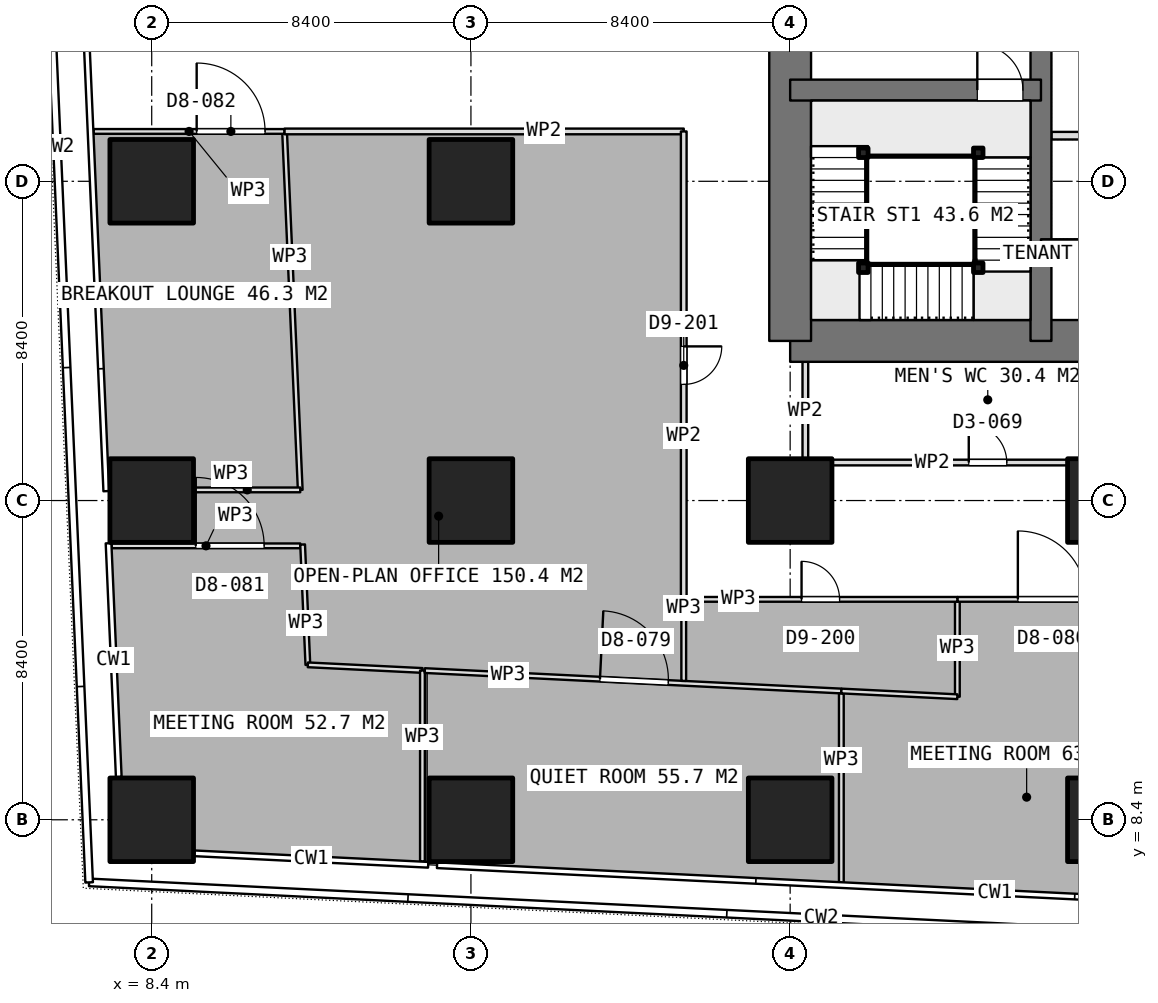
"""IFC4 building model, lengths in metres.
Left out: names, types, materials, properties, quantities, classifications, styles, units other than length and angle.
Written with IfcOpenShell. Run it as: python <this file> out.ifc"""

import sys

from ifc_helpers import new_model, si_unit, direction, frame, frame_2d, origin, origin_2d, place, context, subcontext, project, spatial, rectangle, extrude, element, fill, save


model = new_model("IFC4")
c1 = context("Model", 3, precision=1e-05, world=origin(), true_north=direction((0.0, 1.0)))
c2 = subcontext(c1, "Body", "Model", "MODEL_VIEW")
j1 = project(units=[si_unit("LENGTHUNIT", "METRE"), si_unit("PLANEANGLEUNIT", "RADIAN")], contexts=[c1])
p1 = place(None, origin())
s1 = spatial("IfcSite", under=j1, at=p1, CompositionType="ELEMENT")
p2 = place(p1, origin())
s2 = spatial("IfcBuilding", under=s1, at=p2, CompositionType="ELEMENT")
p3 = place(p2, frame((0.0, 0.0, 62.9)))
s3 = spatial("IfcBuildingStorey", under=s2, at=p3, CompositionType="ELEMENT", Elevation=62.9)
p4 = place(p3, frame((25.2, 21.0, 0.0), z_axis=(0.0, 0.0, 1.0), x_axis=(1.0, 0.0, 0.0)))
e1 = element("IfcWall", 1, at=p4, inside=s3, PredefinedType="SHEAR", context=c2, shape_type="SweptSolid", body=[
    extrude(rectangle(XDim=10.4, YDim=1.1, at=frame_2d((5.2, 0.0))), origin(), (0.0, 0.0, 1.0), 3.75),
])
p5 = place(p3, frame((25.2, 21.0, 0.0), z_axis=(0.0, 0.0, 1.0), x_axis=(0.0, 1.0, 0.0)))
e2 = element("IfcWall", 2, at=p5, inside=s3, PredefinedType="SHEAR", context=c2, shape_type="SweptSolid", body=[
    extrude(rectangle(XDim=25.2, YDim=1.1, at=frame_2d((12.6, 0.0))), origin(), (0.0, 0.0, 1.0), 3.75),
])
p6 = place(p5, frame((7.8, 0.0, 0.0)))
e3 = element("IfcOpeningElement", 3, at=p6, cuts=e2, PredefinedType="OPENING", context=c2, shape_type="SweptSolid", body=[
    extrude(rectangle(XDim=1.2, YDim=2.1, at=frame_2d((0.6, 1.05))), frame((0.0, 0.56, 0.0), z_axis=(0.0, -1.0, 0.0), x_axis=(1.0, 0.0, 0.0)), (0.0, 0.0, 1.0), 1.12),
])
p7 = place(p5, frame((14.25, 0.0, 0.0)))
e4 = element("IfcOpeningElement", 4, at=p7, cuts=e2, PredefinedType="OPENING", context=c2, shape_type="SweptSolid", body=[
    extrude(rectangle(XDim=0.9, YDim=2.1, at=frame_2d((0.45, 1.05))), frame((0.0, 0.56, 0.0), z_axis=(0.0, -1.0, 0.0), x_axis=(1.0, 0.0, 0.0)), (0.0, 0.0, 1.0), 1.12),
])
p8 = place(p5, frame((16.85, 0.0, 0.0)))
e5 = element("IfcOpeningElement", 5, at=p8, cuts=e2, PredefinedType="OPENING", context=c2, shape_type="SweptSolid", body=[
    extrude(rectangle(XDim=0.9, YDim=2.1, at=frame_2d((0.45, 1.05))), frame((0.0, 0.56, 0.0), z_axis=(0.0, -1.0, 0.0), x_axis=(1.0, 0.0, 0.0)), (0.0, 0.0, 1.0), 1.12),
])
p9 = place(p5, frame((19.075, 0.0, 0.0)))
e6 = element("IfcOpeningElement", 6, at=p9, cuts=e2, PredefinedType="OPENING", context=c2, shape_type="SweptSolid", body=[
    extrude(rectangle(XDim=1.2, YDim=2.1, at=frame_2d((0.6, 1.05))), frame((0.0, 0.56, 0.0), z_axis=(0.0, -1.0, 0.0), x_axis=(1.0, 0.0, 0.0)), (0.0, 0.0, 1.0), 1.12),
])
p10 = place(p3, frame((31.8, 21.0, 0.0), z_axis=(0.0, 0.0, 1.0), x_axis=(0.0, 1.0, 0.0)))
e7 = element("IfcWall", 7, at=p10, inside=s3, PredefinedType="SHEAR", context=c2, shape_type="SweptSolid", body=[
    extrude(rectangle(XDim=25.2, YDim=0.55, at=frame_2d((12.6, 0.0))), origin(), (0.0, 0.0, 1.0), 3.75),
])
p11 = place(p3, frame((31.8, 23.4, 0.0), z_axis=(0.0, 0.0, 1.0), x_axis=(1.0, 0.0, 0.0)))
e8 = element("IfcWall", 8, at=p11, inside=s3, PredefinedType="SHEAR", context=c2, shape_type="SweptSolid", body=[
    extrude(rectangle(XDim=3.8, YDim=0.55, at=frame_2d((1.9, 0.0))), origin(), (0.0, 0.0, 1.0), 3.75),
])
p12 = place(p3, frame((25.2, 27.6, 0.0), z_axis=(0.0, 0.0, 1.0), x_axis=(1.0, 0.0, 0.0)))
e9 = element("IfcWall", 9, at=p12, inside=s3, PredefinedType="SHEAR", context=c2, shape_type="SweptSolid", body=[
    extrude(rectangle(XDim=6.6, YDim=0.55, at=frame_2d((3.3, 0.0))), origin(), (0.0, 0.0, 1.0), 3.75),
])
p13 = place(p12, frame((4.925, 0.0, 0.0)))
e10 = element("IfcOpeningElement", 10, at=p13, cuts=e9, PredefinedType="OPENING", context=c2, shape_type="SweptSolid", body=[
    extrude(rectangle(XDim=1.2, YDim=2.1, at=frame_2d((0.6, 1.05))), frame((0.0, 0.285, 0.0), z_axis=(0.0, -1.0, 0.0), x_axis=(1.0, 0.0, 0.0)), (0.0, 0.0, 1.0), 0.57),
])
for number, where, z_axis, x_axis in (
    (11, (8.4, 8.4, 0.0), (0.0, 0.0, 1.0), (1.0, 0.0, 0.0)),
    (12, (8.4, 16.8, 0.0), (0.0, 0.0, 1.0), (1.0, 0.0, 0.0)),
    (13, (8.4, 25.2, 0.0), (0.0, 0.0, 1.0), (1.0, 0.0, 0.0)),
    (14, (16.8, 8.4, 0.0), (0.0, 0.0, 1.0), (1.0, 0.0, 0.0)),
    (15, (16.8, 16.8, 0.0), (0.0, 0.0, 1.0), (1.0, 0.0, 0.0)),
    (16, (16.8, 25.2, 0.0), (0.0, 0.0, 1.0), (1.0, 0.0, 0.0)),
    (17, (25.2, 8.4, 0.0), (0.0, 0.0, 1.0), (1.0, 0.0, 0.0)),
    (18, (25.2, 16.8, 0.0), (0.0, 0.0, 1.0), (1.0, 0.0, 0.0)),
    (19, (33.6, 8.4, 0.0), (0.0, 0.0, 1.0), (1.0, 0.0, 0.0)),
    (20, (33.6, 16.8, 0.0), (0.0, 0.0, 1.0), (1.0, 0.0, 0.0)),
):
    element("IfcColumn", number, at=place(p3, frame(where, z_axis=z_axis, x_axis=x_axis)), inside=s3, PredefinedType="COLUMN", context=c2, shape_type="SweptSolid", body=[
        extrude(rectangle(XDim=2.2, YDim=2.2, at=origin_2d()), origin(), (0.0, 0.0, 1.0), 3.75),
    ])
p14 = place(p3, frame((32.075, 26.4, 0.0), z_axis=(0.0, 0.0, 1.0), x_axis=(1.0, 0.0, 0.0)))
e21 = element("IfcWall", 21, at=p14, inside=s3, PredefinedType="PARTITIONING", context=c2, shape_type="SweptSolid", body=[
    extrude(rectangle(XDim=3.25, YDim=0.2, at=frame_2d((1.625, 0.0))), origin(), (0.0, 0.0, 1.0), 3.5),
])
p15 = place(p3, frame((25.525, 17.8, 0.0), z_axis=(0.0, 0.0, 1.0), x_axis=(1.0, 0.0, 0.0)))
e22 = element("IfcWall", 22, at=p15, inside=s3, PredefinedType="PARTITIONING", context=c2, shape_type="SweptSolid", body=[
    extrude(rectangle(XDim=9.75, YDim=0.15, at=frame_2d((4.875, 0.0))), origin(), (0.0, 0.0, 1.0), 3.5),
])
p16 = place(p15, frame((4.375, 0.0, 0.0)))
e23 = element("IfcOpeningElement", 23, at=p16, cuts=e22, PredefinedType="OPENING", context=c2, shape_type="SweptSolid", body=[
    extrude(rectangle(XDim=1.0, YDim=2.1, at=frame_2d((0.5, 1.05))), frame((0.0, 0.085, 0.0), z_axis=(0.0, -1.0, 0.0), x_axis=(1.0, 0.0, 0.0)), (0.0, 0.0, 1.0), 0.17),
])
p17 = place(p3, frame((25.6, 17.875, 0.0), z_axis=(0.0, 0.0, 1.0), x_axis=(0.0, 1.0, 0.0)))
e24 = element("IfcWall", 24, at=p17, inside=s3, PredefinedType="PARTITIONING", context=c2, shape_type="SweptSolid", body=[
    extrude(rectangle(XDim=2.575, YDim=0.15, at=frame_2d((1.288, 0.0))), origin(), (0.0, 0.0, 1.0), 3.5),
])
p18 = place(p3, frame((11.896, 26.512, 0.0), z_axis=(0.0, 0.0, 1.0), x_axis=(0.043651567972, -0.999046816027, 0.0)))
e25 = element("IfcWall", 25, at=p18, inside=s3, PredefinedType="PARTITIONING", context=c2, shape_type="SweptSolid", body=[
    extrude(rectangle(XDim=9.441, YDim=0.125, at=frame_2d((4.72, 0.0))), origin(), (0.0, 0.0, 1.0), 3.5),
])
p19 = place(p3, frame((12.308, 17.08, 0.0), z_axis=(0.0, 0.0, 1.0), x_axis=(-1.0, 0.0, 0.0)))
e26 = element("IfcWall", 26, at=p19, inside=s3, PredefinedType="PARTITIONING", context=c2, shape_type="SweptSolid", body=[
    extrude(rectangle(XDim=2.788, YDim=0.125, at=frame_2d((1.394, 0.0))), origin(), (0.0, 0.0, 1.0), 3.5),
])
p20 = place(p3, frame((6.871, 26.512, 0.0), z_axis=(0.0, 0.0, 1.0), x_axis=(1.0, 0.0, 0.0)))
e27 = element("IfcWall", 27, at=p20, inside=s3, PredefinedType="PARTITIONING", context=c2, shape_type="SweptSolid", body=[
    extrude(rectangle(XDim=5.025, YDim=0.125, at=frame_2d((2.512, 0.0))), origin(), (0.0, 0.0, 1.0), 3.5),
])
p21 = place(p20, frame((2.712, 0.0, 0.0)))
e28 = element("IfcOpeningElement", 28, at=p21, cuts=e27, PredefinedType="OPENING", context=c2, shape_type="SweptSolid", body=[
    extrude(rectangle(XDim=1.8, YDim=2.1, at=frame_2d((0.9, 1.05))), frame((0.0, 0.073, 0.0), z_axis=(0.0, -1.0, 0.0), x_axis=(1.0, 0.0, 0.0)), (0.0, 0.0, 1.0), 0.145),
])
p22 = place(p3, frame((7.347, 15.608, 0.0), z_axis=(0.0, 0.0, 1.0), x_axis=(1.0, 0.0, 0.0)))
e29 = element("IfcWall", 29, at=p22, inside=s3, PredefinedType="PARTITIONING", context=c2, shape_type="SweptSolid", body=[
    extrude(rectangle(XDim=4.963, YDim=0.125, at=frame_2d((2.481, 0.0))), origin(), (0.0, 0.0, 1.0), 3.5),
])
p23 = place(p22, frame((2.212, 0.0, 0.0)))
e30 = element("IfcOpeningElement", 30, at=p23, cuts=e29, PredefinedType="OPENING", context=c2, shape_type="SweptSolid", body=[
    extrude(rectangle(XDim=1.8, YDim=2.1, at=frame_2d((0.9, 1.05))), frame((0.0, 0.073, 0.0), z_axis=(0.0, -1.0, 0.0), x_axis=(1.0, 0.0, 0.0)), (0.0, 0.0, 1.0), 0.145),
])
p24 = place(p3, frame((12.371, 15.643, 0.0), z_axis=(0.0, 0.0, 1.0), x_axis=(0.043527491497, -0.999052229608, 0.0)))
e31 = element("IfcWall", 31, at=p24, inside=s3, PredefinedType="PARTITIONING", context=c2, shape_type="SweptSolid", body=[
    extrude(rectangle(XDim=3.169, YDim=0.125, at=frame_2d((1.584, 0.0))), origin(), (0.0, 0.0, 1.0), 3.5),
])
p25 = place(p3, frame((12.509, 12.477, 0.0), z_axis=(0.0, 0.0, 1.0), x_axis=(0.9987981005, -0.049013818844, 0.0)))
e32 = element("IfcWall", 32, at=p25, inside=s3, PredefinedType="PARTITIONING", context=c2, shape_type="SweptSolid", body=[
    extrude(rectangle(XDim=3.019, YDim=0.125, at=frame_2d((1.509, 0.0))), origin(), (0.0, 0.0, 1.0), 3.5),
])
p26 = place(p3, frame((15.524, 12.329, 0.0), z_axis=(0.0, 0.0, 1.0), x_axis=(0.0, -1.0, 0.0)))
e33 = element("IfcWall", 33, at=p26, inside=s3, PredefinedType="PARTITIONING", context=c2, shape_type="SweptSolid", body=[
    extrude(rectangle(XDim=5.026, YDim=0.125, at=frame_2d((2.513, 0.0))), origin(), (0.0, 0.0, 1.0), 3.5),
])
p27 = place(p3, frame((15.586, 12.326, 0.0), z_axis=(0.0, 0.0, 1.0), x_axis=(0.998798341691, -0.04900890364, 0.0)))
e34 = element("IfcWall", 34, at=p27, inside=s3, PredefinedType="PARTITIONING", context=c2, shape_type="SweptSolid", body=[
    extrude(rectangle(XDim=10.974, YDim=0.125, at=frame_2d((5.487, 0.0))), origin(), (0.0, 0.0, 1.0), 3.5),
])
p28 = place(p27, frame((4.615, 0.0, 0.0)))
e35 = element("IfcOpeningElement", 35, at=p28, cuts=e34, PredefinedType="OPENING", context=c2, shape_type="SweptSolid", body=[
    extrude(rectangle(XDim=1.8, YDim=2.1, at=frame_2d((0.9, 1.05))), frame((0.0, 0.073, 0.0), z_axis=(0.0, -1.0, 0.0), x_axis=(1.0, 0.0, 0.0)), (0.0, 0.0, 1.0), 0.145),
])
p29 = place(p3, frame((26.547, 11.725, 0.0), z_axis=(0.0, 0.0, 1.0), x_axis=(0.0, -1.0, 0.0)))
e36 = element("IfcWall", 36, at=p29, inside=s3, PredefinedType="PARTITIONING", context=c2, shape_type="SweptSolid", body=[
    extrude(rectangle(XDim=4.993, YDim=0.125, at=frame_2d((2.497, 0.0))), origin(), (0.0, 0.0, 1.0), 3.5),
])
p30 = place(p3, frame((29.6, 11.638, 0.0), z_axis=(0.0, 0.0, 1.0), x_axis=(0.0, 1.0, 0.0)))
e37 = element("IfcWall", 37, at=p30, inside=s3, PredefinedType="PARTITIONING", context=c2, shape_type="SweptSolid", body=[
    extrude(rectangle(XDim=2.562, YDim=0.125, at=frame_2d((1.281, 0.0))), origin(), (0.0, 0.0, 1.0), 3.5),
])
p31 = place(p3, frame((29.6, 14.2, 0.0), z_axis=(0.0, 0.0, 1.0), x_axis=(1.0, 0.0, 0.0)))
e38 = element("IfcWall", 38, at=p31, inside=s3, PredefinedType="PARTITIONING", context=c2, shape_type="SweptSolid", body=[
    extrude(rectangle(XDim=4.984, YDim=0.125, at=frame_2d((2.492, 0.0))), origin(), (0.0, 0.0, 1.0), 3.5),
])
p32 = place(p31, frame((1.592, 0.0, 0.0)))
e39 = element("IfcOpeningElement", 39, at=p32, cuts=e38, PredefinedType="OPENING", context=c2, shape_type="SweptSolid", body=[
    extrude(rectangle(XDim=1.8, YDim=2.1, at=frame_2d((0.9, 1.05))), frame((0.0, 0.073, 0.0), z_axis=(0.0, -1.0, 0.0), x_axis=(1.0, 0.0, 0.0)), (0.0, 0.0, 1.0), 0.145),
])
p33 = place(p3, frame((26.548, 11.788, 0.0), z_axis=(0.0, 0.0, 1.0), x_axis=(0.998792065816, -0.049136638707, 0.0)))
e40 = element("IfcWall", 40, at=p33, inside=s3, PredefinedType="PARTITIONING", context=c2, shape_type="SweptSolid", body=[
    extrude(rectangle(XDim=3.056, YDim=0.125, at=frame_2d((1.528, 0.0))), origin(), (0.0, 0.0, 1.0), 3.5),
])
p34 = place(p3, frame((22.4, 12.054, 0.0), z_axis=(0.0, 0.0, 1.0), x_axis=(0.0, 1.0, 0.0)))
e41 = element("IfcWall", 41, at=p34, inside=s3, PredefinedType="PARTITIONING", context=c2, shape_type="SweptSolid", body=[
    extrude(rectangle(XDim=2.146, YDim=0.125, at=frame_2d((1.073, 0.0))), origin(), (0.0, 0.0, 1.0), 3.5),
])
p35 = place(p3, frame((22.4, 14.2, 0.0), z_axis=(0.0, 0.0, 1.0), x_axis=(1.0, 0.0, 0.0)))
e42 = element("IfcWall", 42, at=p35, inside=s3, PredefinedType="PARTITIONING", context=c2, shape_type="SweptSolid", body=[
    extrude(rectangle(XDim=7.2, YDim=0.125, at=frame_2d((3.6, 0.0))), origin(), (0.0, 0.0, 1.0), 3.5),
])
p36 = place(p35, frame((3.1, 0.0, 0.0)))
e43 = element("IfcOpeningElement", 43, at=p36, cuts=e42, PredefinedType="OPENING", context=c2, shape_type="SweptSolid", body=[
    extrude(rectangle(XDim=1.0, YDim=2.1, at=frame_2d((0.5, 1.05))), frame((0.0, 0.073, 0.0), z_axis=(0.0, -1.0, 0.0), x_axis=(1.0, 0.0, 0.0)), (0.0, 0.0, 1.0), 0.145),
])
p37 = place(p3, frame((11.896, 26.512, 0.0), z_axis=(0.0, 0.0, 1.0), x_axis=(1.0, 0.0, 0.0)))
e44 = element("IfcWall", 44, at=p37, inside=s3, PredefinedType="PARTITIONING", context=c2, shape_type="SweptSolid", body=[
    extrude(rectangle(XDim=10.504, YDim=0.15, at=frame_2d((5.252, 0.0))), origin(), (0.0, 0.0, 1.0), 3.5),
])
p38 = place(p3, frame((22.4, 26.512, 0.0), z_axis=(0.0, 0.0, 1.0), x_axis=(0.0, -1.0, 0.0)))
e45 = element("IfcWall", 45, at=p38, inside=s3, PredefinedType="PARTITIONING", context=c2, shape_type="SweptSolid", body=[
    extrude(rectangle(XDim=12.312, YDim=0.15, at=frame_2d((6.156, 0.0))), origin(), (0.0, 0.0, 1.0), 3.5),
])
p39 = place(p38, frame((5.656, 0.0, 0.0)))
e46 = element("IfcOpeningElement", 46, at=p39, cuts=e45, PredefinedType="OPENING", context=c2, shape_type="SweptSolid", body=[
    extrude(rectangle(XDim=1.0, YDim=2.1, at=frame_2d((0.5, 1.05))), frame((0.0, 0.085, 0.0), z_axis=(0.0, -1.0, 0.0), x_axis=(1.0, 0.0, 0.0)), (0.0, 0.0, 1.0), 0.17),
])
for number, where, z_axis, x_axis in (
    (47, (30.15, 25.95, 0.0), (0.0, 0.0, 1.0), (1.0, 0.0, 0.0)),
    (48, (30.15, 22.925, 0.0), (0.0, 0.0, 1.0), (1.0, 0.0, 0.0)),
    (49, (27.125, 22.925, 0.0), (0.0, 0.0, 1.0), (1.0, 0.0, 0.0)),
    (50, (27.125, 25.95, 0.0), (0.0, 0.0, 1.0), (1.0, 0.0, 0.0)),
):
    element("IfcColumn", number, at=place(p3, frame(where, z_axis=z_axis, x_axis=x_axis)), inside=s3, PredefinedType="COLUMN", context=c2, shape_type="SweptSolid", body=[
        extrude(rectangle(XDim=0.25, YDim=0.25, at=origin_2d()), origin(), (0.0, 0.0, 1.0), 3.75),
    ])
p40 = place(p16, origin())
e51 = element("IfcDoor", 51, at=p40, inside=s3, OperationType="SINGLE_SWING_LEFT", PredefinedType="DOOR", context=c2, shape_type="SweptSolid", body=[
    extrude(rectangle(XDim=1.0, YDim=2.1, at=frame_2d((0.5, 1.05))), frame((0.0, 0.025, 0.0), z_axis=(0.0, -1.0, 0.0), x_axis=(1.0, 0.0, 0.0)), (0.0, 0.0, 1.0), 0.05),
])
fill(e23, e51)
p41 = place(p21, origin())
e52 = element("IfcDoor", 52, at=p41, inside=s3, OperationType="DOUBLE_DOOR_SINGLE_SWING", PredefinedType="DOOR", context=c2, shape_type="SweptSolid", body=[
    extrude(rectangle(XDim=1.8, YDim=2.1, at=frame_2d((0.9, 1.05))), frame((0.0, 0.025, 0.0), z_axis=(0.0, -1.0, 0.0), x_axis=(1.0, 0.0, 0.0)), (0.0, 0.0, 1.0), 0.05),
])
fill(e28, e52)
p42 = place(p23, origin())
e53 = element("IfcDoor", 53, at=p42, inside=s3, OperationType="DOUBLE_DOOR_SINGLE_SWING", PredefinedType="DOOR", context=c2, shape_type="SweptSolid", body=[
    extrude(rectangle(XDim=1.8, YDim=2.1, at=frame_2d((0.9, 1.05))), frame((0.0, 0.025, 0.0), z_axis=(0.0, -1.0, 0.0), x_axis=(1.0, 0.0, 0.0)), (0.0, 0.0, 1.0), 0.05),
])
fill(e30, e53)
p43 = place(p28, origin())
e54 = element("IfcDoor", 54, at=p43, inside=s3, OperationType="DOUBLE_DOOR_SINGLE_SWING", PredefinedType="DOOR", context=c2, shape_type="SweptSolid", body=[
    extrude(rectangle(XDim=1.8, YDim=2.1, at=frame_2d((0.9, 1.05))), frame((0.0, 0.025, 0.0), z_axis=(0.0, -1.0, 0.0), x_axis=(1.0, 0.0, 0.0)), (0.0, 0.0, 1.0), 0.05),
])
fill(e35, e54)
p44 = place(p32, origin())
e55 = element("IfcDoor", 55, at=p44, inside=s3, OperationType="DOUBLE_DOOR_SINGLE_SWING", PredefinedType="DOOR", context=c2, shape_type="SweptSolid", body=[
    extrude(rectangle(XDim=1.8, YDim=2.1, at=frame_2d((0.9, 1.05))), frame((0.0, 0.025, 0.0), z_axis=(0.0, -1.0, 0.0), x_axis=(1.0, 0.0, 0.0)), (0.0, 0.0, 1.0), 0.05),
])
fill(e39, e55)
p45 = place(p36, origin())
e56 = element("IfcDoor", 56, at=p45, inside=s3, OperationType="SINGLE_SWING_LEFT", PredefinedType="DOOR", context=c2, shape_type="SweptSolid", body=[
    extrude(rectangle(XDim=1.0, YDim=2.1, at=frame_2d((0.5, 1.05))), frame((0.0, 0.025, 0.0), z_axis=(0.0, -1.0, 0.0), x_axis=(1.0, 0.0, 0.0)), (0.0, 0.0, 1.0), 0.05),
])
fill(e43, e56)
p46 = place(p39, origin())
e57 = element("IfcDoor", 57, at=p46, inside=s3, OperationType="SINGLE_SWING_LEFT", PredefinedType="DOOR", context=c2, shape_type="SweptSolid", body=[
    extrude(rectangle(XDim=1.0, YDim=2.1, at=frame_2d((0.5, 1.05))), frame((0.0, 0.025, 0.0), z_axis=(0.0, -1.0, 0.0), x_axis=(1.0, 0.0, 0.0)), (0.0, 0.0, 1.0), 0.05),
])
fill(e46, e57)
p47 = place(p13, origin())
e58 = element("IfcDoor", 58, at=p47, inside=s3, OperationType="SINGLE_SWING_RIGHT", PredefinedType="DOOR", context=c2, shape_type="SweptSolid", body=[
    extrude(rectangle(XDim=1.2, YDim=2.1, at=frame_2d((0.6, 1.05))), frame((0.0, 0.025, 0.0), z_axis=(0.0, -1.0, 0.0), x_axis=(1.0, 0.0, 0.0)), (0.0, 0.0, 1.0), 0.05),
])
fill(e10, e58)
save(model, sys.argv[1])
